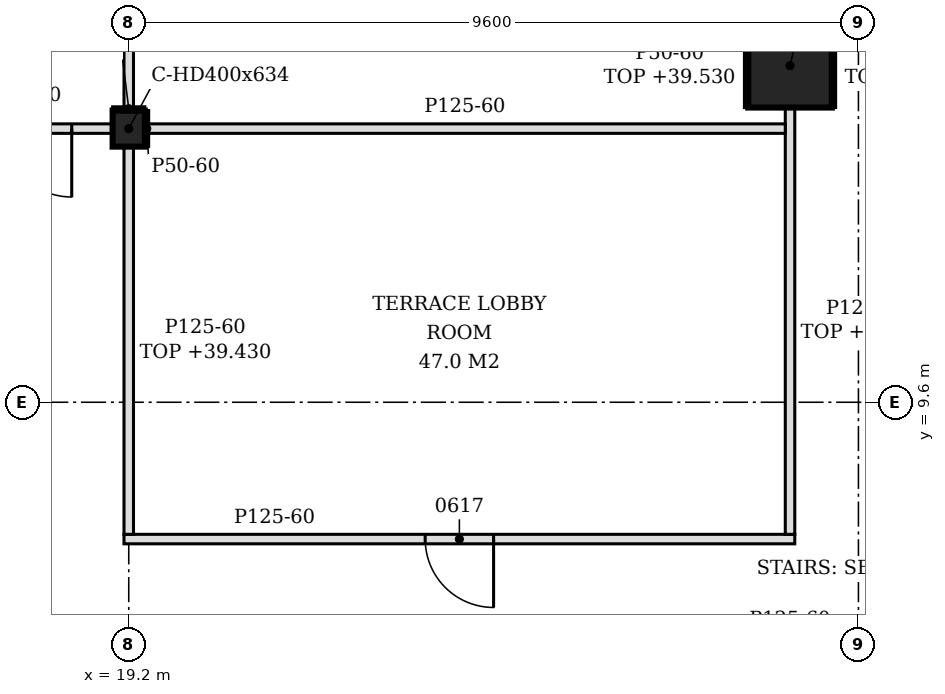
"""IFC4 building model, lengths in metres.
Left out: names, types, materials, properties, quantities, classifications, styles, units other than length and angle.
Written with IfcOpenShell. Run it as: python <this file> out.ifc"""

import sys

from ifc_helpers import new_model, si_unit, direction, frame, frame_2d, origin, origin_2d, place, context, subcontext, project, spatial, polyline, rectangle, hollow_rectangle, i_section, outline, extrude, element, fill, save


model = new_model("IFC4")
c1 = context("Model", 3, precision=1e-05, world=origin(), true_north=direction((0.0, 1.0)))
c2 = subcontext(c1, "Body", "Model", "MODEL_VIEW")
j1 = project(units=[si_unit("LENGTHUNIT", "METRE"), si_unit("PLANEANGLEUNIT", "RADIAN")], contexts=[c1])
p1 = place(None, origin())
s1 = spatial("IfcSite", under=j1, at=p1, CompositionType="ELEMENT")
p2 = place(p1, origin())
s2 = spatial("IfcBuilding", under=s1, at=p2, CompositionType="ELEMENT")
p3 = place(p2, frame((0.0, 0.0, 35.4)))
s3 = spatial("IfcBuildingStorey", under=s2, at=p3, CompositionType="ELEMENT", Elevation=35.4)
p4 = place(p3, frame((27.9, 14.027, -0.2), z_axis=(0.0, 0.0, 1.0), x_axis=(1.0, 0.0, 0.0)))
e1 = element("IfcColumn", 1, at=p4, inside=s3, PredefinedType="COLUMN", context=c2, shape_type="SweptSolid", body=[
    extrude(hollow_rectangle(XDim=1.1, YDim=1.1, WallThickness=0.06, at=origin_2d()), origin(), (0.0, 0.0, 1.0), 4.85),
])
p5 = place(p3, frame((19.2, 13.2, -0.2), z_axis=(0.0, 0.0, 1.0), x_axis=(1.0, 0.0, 0.0)))
e2 = element("IfcColumn", 2, at=p5, inside=s3, PredefinedType="COLUMN", context=c2, shape_type="SweptSolid", body=[
    extrude(i_section(OverallWidth=0.424, OverallDepth=0.474, WebThickness=0.048, FlangeThickness=0.077, FilletRadius=0.015, at=origin_2d()), origin(), (0.0, 0.0, 1.0), 4.85),
])
p6 = place(p3, frame((19.137, 7.8, 0.0), z_axis=(0.0, 0.0, 1.0), x_axis=(1.0, 0.0, 0.0)))
e3 = element("IfcWall", 3, at=p6, inside=s3, PredefinedType="PARTITIONING", context=c2, shape_type="SweptSolid", body=[
    extrude(outline(polyline([(0.0, 0.0), (8.825, 0.0), (8.825, 4.13), (8.613, 4.13), (8.611, 4.65), (0.212, 4.65), (0.21, 4.03), (0.0, 4.03), (0.0, 0.0)])), frame((0.0, 0.062, 0.0), z_axis=(0.0, -1.0, 0.0), x_axis=(1.0, 0.0, 0.0)), (0.0, 0.0, 1.0), 0.125),
])
p7 = place(p6, frame((3.962, 0.0, 0.0)))
e4 = element("IfcOpeningElement", 4, at=p7, cuts=e3, PredefinedType="OPENING", context=c2, shape_type="SweptSolid", body=[
    extrude(rectangle(XDim=0.9, YDim=2.1, at=frame_2d((0.45, 1.05))), frame((0.0, 0.073, 0.0), z_axis=(0.0, -1.0, 0.0), x_axis=(1.0, 0.0, 0.0)), (0.0, 0.0, 1.0), 0.145),
])
p8 = place(p3, frame((19.2, 7.863, 0.0), z_axis=(0.0, 0.0, 1.0), x_axis=(0.0, 1.0, 0.0)))
e5 = element("IfcWall", 5, at=p8, inside=s3, PredefinedType="PARTITIONING", context=c2, shape_type="SweptSolid", body=[
    extrude(rectangle(XDim=5.1, YDim=0.125, at=frame_2d((2.55, 0.0))), origin(), (0.0, 0.0, 1.0), 4.03),
])
p9 = place(p3, frame((27.9, 7.863, 0.0), z_axis=(0.0, 0.0, 1.0), x_axis=(0.0, 1.0, 0.0)))
e6 = element("IfcWall", 6, at=p9, inside=s3, PredefinedType="PARTITIONING", context=c2, shape_type="SweptSolid", body=[
    extrude(rectangle(XDim=5.615, YDim=0.125, at=frame_2d((2.807, 0.0))), origin(), (0.0, 0.0, 1.0), 4.13),
])
p10 = place(p3, frame((7.412, 13.2, 0.0), z_axis=(0.0, 0.0, 1.0), x_axis=(1.0, 0.0, 0.0)))
e7 = element("IfcWall", 7, at=p10, inside=s3, PredefinedType="PARTITIONING", context=c2, shape_type="SweptSolid", body=[
    extrude(rectangle(XDim=11.576, YDim=0.125, at=frame_2d((5.788, 0.0))), origin(), (0.0, 0.0, 1.0), 4.03),
])
p11 = place(p10, frame((5.293, 0.0, 0.0)))
e8 = element("IfcOpeningElement", 8, at=p11, cuts=e7, PredefinedType="OPENING", context=c2, shape_type="SweptSolid", body=[
    extrude(rectangle(XDim=0.8, YDim=2.1, at=frame_2d((0.4, 1.05))), frame((0.0, 0.073, 0.0), z_axis=(0.0, -1.0, 0.0), x_axis=(1.0, 0.0, 0.0)), (0.0, 0.0, 1.0), 0.145),
])
p12 = place(p10, frame((10.138, 0.0, 0.0)))
e9 = element("IfcOpeningElement", 9, at=p12, cuts=e7, PredefinedType="OPENING", context=c2, shape_type="SweptSolid", body=[
    extrude(rectangle(XDim=0.9, YDim=2.1, at=frame_2d((0.45, 1.05))), frame((0.0, 0.073, 0.0), z_axis=(0.0, -1.0, 0.0), x_axis=(1.0, 0.0, 0.0)), (0.0, 0.0, 1.0), 0.145),
])
p13 = place(p3, frame((19.412, 13.2, 0.0), z_axis=(0.0, 0.0, 1.0), x_axis=(1.0, 0.0, 0.0)))
e10 = element("IfcWall", 10, at=p13, inside=s3, PredefinedType="PARTITIONING", context=c2, shape_type="SweptSolid", body=[
    extrude(outline(polyline([(0.0, 0.0), (8.425, 0.0), (8.426, 4.13), (8.338, 4.13), (8.336, 4.65), (0.0, 4.65), (0.0, 0.0)])), frame((0.0, 0.062, 0.0), z_axis=(0.0, -1.0, 0.0), x_axis=(1.0, 0.0, 0.0)), (0.0, 0.0, 1.0), 0.125),
])
p14 = place(p3, frame((19.2, 13.437, 0.0), z_axis=(0.0, 0.0, 1.0), x_axis=(0.0, 1.0, 0.0)))
e11 = element("IfcWall", 11, at=p14, inside=s3, PredefinedType="PARTITIONING", context=c2, shape_type="SweptSolid", body=[
    extrude(rectangle(XDim=9.113, YDim=0.125, at=frame_2d((4.557, 0.0))), origin(), (0.0, 0.0, 1.0), 4.13),
])
p15 = place(p3, frame((19.437, 12.963, 0.0), z_axis=(0.0, 0.0, 1.0), x_axis=(0.0, 1.0, 0.0)))
e12 = element("IfcWall", 12, at=p15, inside=s3, PredefinedType="PARTITIONING", context=c2, shape_type="SweptSolid", body=[
    extrude(rectangle(XDim=0.474, YDim=0.05, at=frame_2d((0.237, 0.0))), origin(), (0.0, 0.0, 1.0), 4.65),
])
for number, where, z_axis, x_axis in (
    (13, (27.325, 13.477, 0.0), (0.0, 0.0, 1.0), (0.0, 1.0, 0.0)),
    (14, (28.475, 13.477, 0.0), (0.0, 0.0, 1.0), (0.0, 1.0, 0.0)),
):
    element("IfcWall", number, at=place(p3, frame(where, z_axis=z_axis, x_axis=x_axis)), inside=s3, PredefinedType="PARTITIONING", context=c2, shape_type="SweptSolid", body=[
        extrude(rectangle(XDim=1.1, YDim=0.05, at=frame_2d((0.55, 0.0))), origin(), (0.0, 0.0, 1.0), 4.13),
    ])
p16 = place(p3, frame((18.988, 13.462, 0.0), z_axis=(0.0, 0.0, 1.0), x_axis=(1.0, 0.0, 0.0)))
e15 = element("IfcWall", 15, at=p16, inside=s3, PredefinedType="PARTITIONING", context=c2, shape_type="SweptSolid", body=[
    extrude(rectangle(XDim=0.424, YDim=0.05, at=frame_2d((0.212, 0.0))), origin(), (0.0, 0.0, 1.0), 4.13),
])
p17 = place(p12, frame((0.9, 0.0, 0.0), z_axis=(0.0, 0.0, 1.0), x_axis=(-1.0, 0.0, 0.0)))
e16 = element("IfcDoor", 16, at=p17, inside=s3, OperationType="SINGLE_SWING_LEFT", PredefinedType="DOOR", context=c2, shape_type="SweptSolid", body=[
    extrude(rectangle(XDim=0.9, YDim=2.1, at=frame_2d((0.45, 1.05))), frame((0.0, 0.025, 0.0), z_axis=(0.0, -1.0, 0.0), x_axis=(1.0, 0.0, 0.0)), (0.0, 0.0, 1.0), 0.05),
])
fill(e9, e16)
p18 = place(p7, frame((0.9, 0.0, 0.0), z_axis=(0.0, 0.0, 1.0), x_axis=(-1.0, 0.0, 0.0)))
e17 = element("IfcDoor", 17, at=p18, inside=s3, OperationType="SINGLE_SWING_LEFT", PredefinedType="DOOR", context=c2, shape_type="SweptSolid", body=[
    extrude(rectangle(XDim=0.9, YDim=2.1, at=frame_2d((0.45, 1.05))), frame((0.0, 0.025, 0.0), z_axis=(0.0, -1.0, 0.0), x_axis=(1.0, 0.0, 0.0)), (0.0, 0.0, 1.0), 0.05),
])
fill(e4, e17)
save(model, sys.argv[1])
